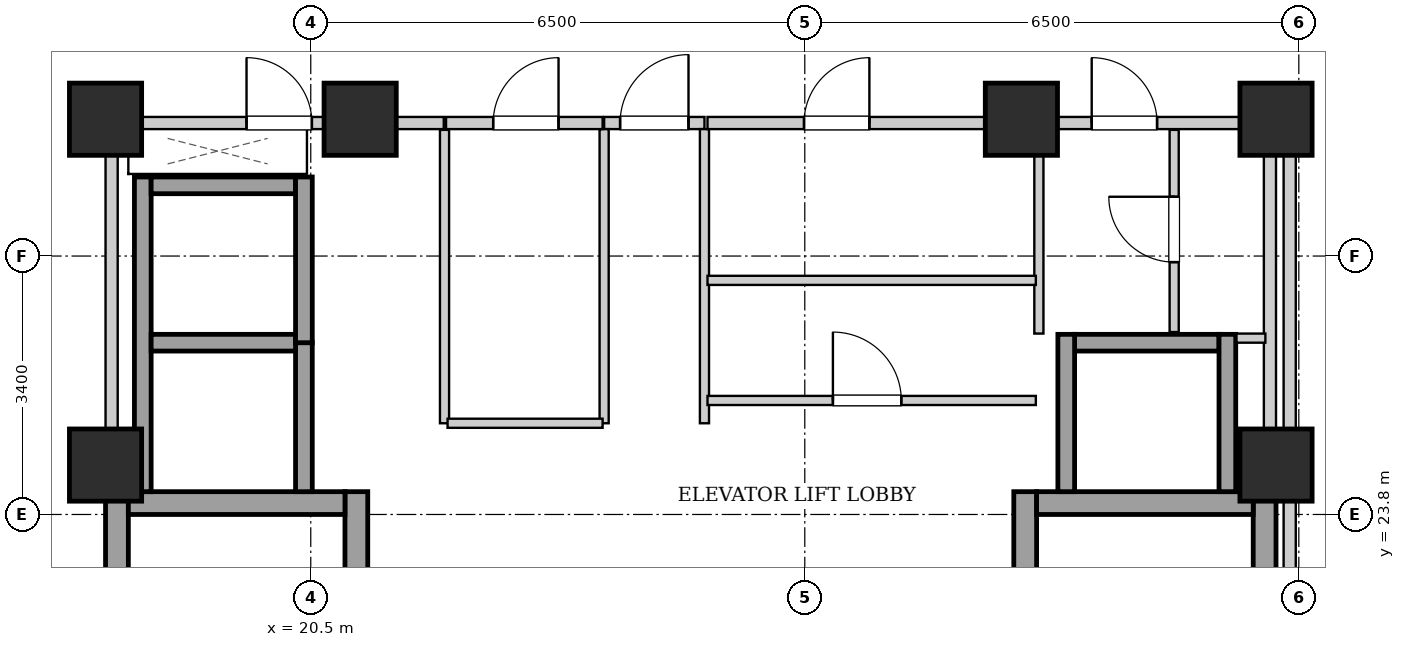
"""IFC4 building model, lengths in metres.
Left out: names, types, materials, properties, quantities, classifications, styles, units other than length and angle.
Written with IfcOpenShell. Run it as: python <this file> out.ifc"""

import sys

from ifc_helpers import new_model, si_unit, direction, frame, frame_2d, origin, origin_2d, place, context, subcontext, project, spatial, rectangle, extrude, element, fill, save


model = new_model("IFC4")
c1 = context("Model", 3, precision=1e-05, world=origin(), true_north=direction((0.0, 1.0)))
c2 = subcontext(c1, "Body", "Model", "MODEL_VIEW")
j1 = project(units=[si_unit("LENGTHUNIT", "METRE"), si_unit("PLANEANGLEUNIT", "RADIAN")], contexts=[c1])
p1 = place(None, origin())
s1 = spatial("IfcSite", under=j1, at=p1, CompositionType="ELEMENT")
p2 = place(p1, origin())
s2 = spatial("IfcBuilding", under=s1, at=p2, CompositionType="ELEMENT")
p3 = place(p2, frame((0.0, 0.0, 153.65)))
s3 = spatial("IfcBuildingStorey", under=s2, at=p3, CompositionType="ELEMENT", Elevation=153.65)
for number, where, z_axis, x_axis in (
    (1, (17.8, 29.0, 0.0), (0.0, 0.0, 1.0), (1.0, 0.0, 0.0)),
    (2, (21.15, 29.0, 0.0), (0.0, 0.0, 1.0), (1.0, 0.0, 0.0)),
    (3, (29.85, 29.0, 0.0), (0.0, 0.0, 1.0), (1.0, 0.0, 0.0)),
    (4, (33.2, 29.0, 0.0), (0.0, 0.0, 1.0), (1.0, 0.0, 0.0)),
    (5, (17.8, 24.45, 0.0), (0.0, 0.0, 1.0), (1.0, 0.0, 0.0)),
    (6, (33.2, 24.45, 0.0), (0.0, 0.0, 1.0), (1.0, 0.0, 0.0)),
):
    element("IfcColumn", number, at=place(p3, frame(where, z_axis=z_axis, x_axis=x_axis)), inside=s3, PredefinedType="COLUMN", context=c2, shape_type="SweptSolid", body=[
        extrude(rectangle(XDim=0.95, YDim=0.95, at=origin_2d()), origin(), (0.0, 0.0, 1.0), 3.25),
    ])
for number, where, z_axis, x_axis in (
    (7, (17.95, 15.1, 0.0), (0.0, 0.0, 1.0), (0.0, 1.0, 0.0)),
    (8, (21.1, 15.1, 0.0), (0.0, 0.0, 1.0), (0.0, 1.0, 0.0)),
):
    element("IfcWall", number, at=place(p3, frame(where, z_axis=z_axis, x_axis=x_axis)), inside=s3, PredefinedType="SHEAR", context=c2, shape_type="SweptSolid", body=[
        extrude(rectangle(XDim=9.0, YDim=0.3, at=frame_2d((4.5, 0.0))), origin(), (0.0, 0.0, 1.0), 2.99),
    ])
p4 = place(p3, frame((18.1, 23.95, 0.0), z_axis=(0.0, 0.0, 1.0), x_axis=(1.0, 0.0, 0.0)))
e9 = element("IfcWall", 9, at=p4, inside=s3, PredefinedType="SHEAR", context=c2, shape_type="SweptSolid", body=[
    extrude(rectangle(XDim=2.85, YDim=0.3, at=frame_2d((1.425, 0.0))), origin(), (0.0, 0.0, 1.0), 2.99),
])
for number, where, z_axis, x_axis in (
    (10, (29.9, 15.1, 0.0), (0.0, 0.0, 1.0), (0.0, 1.0, 0.0)),
    (11, (33.05, 15.1, 0.0), (0.0, 0.0, 1.0), (0.0, 1.0, 0.0)),
):
    element("IfcWall", number, at=place(p3, frame(where, z_axis=z_axis, x_axis=x_axis)), inside=s3, PredefinedType="SHEAR", context=c2, shape_type="SweptSolid", body=[
        extrude(rectangle(XDim=9.0, YDim=0.3, at=frame_2d((4.5, 0.0))), origin(), (0.0, 0.0, 1.0), 2.99),
    ])
p5 = place(p3, frame((30.05, 23.95, 0.0), z_axis=(0.0, 0.0, 1.0), x_axis=(1.0, 0.0, 0.0)))
e12 = element("IfcWall", 12, at=p5, inside=s3, PredefinedType="SHEAR", context=c2, shape_type="SweptSolid", body=[
    extrude(rectangle(XDim=2.85, YDim=0.3, at=frame_2d((1.425, 0.0))), origin(), (0.0, 0.0, 1.0), 2.99),
])
p6 = place(p3, frame((18.29, 24.1, 0.0), z_axis=(0.0, 0.0, 1.0), x_axis=(0.0, 1.0, 0.0)))
e13 = element("IfcWall", 13, at=p6, inside=s3, PredefinedType="SHEAR", context=c2, shape_type="SweptSolid", body=[
    extrude(rectangle(XDim=4.14, YDim=0.22, at=frame_2d((2.07, 0.0))), origin(), (0.0, 0.0, 1.0), 2.99),
])
p7 = place(p3, frame((20.41, 24.1, 0.0), z_axis=(0.0, 0.0, 1.0), x_axis=(0.0, 1.0, 0.0)))
e14 = element("IfcWall", 14, at=p7, inside=s3, PredefinedType="SHEAR", context=c2, shape_type="SweptSolid", body=[
    extrude(rectangle(XDim=1.96, YDim=0.22, at=frame_2d((0.98, 0.0))), origin(), (0.0, 0.0, 1.0), 2.99),
])
for number, where, z_axis, x_axis in (
    (15, (18.4, 26.06, 0.0), (0.0, 0.0, 1.0), (1.0, 0.0, 0.0)),
    (16, (18.4, 28.13, 0.0), (0.0, 0.0, 1.0), (1.0, 0.0, 0.0)),
):
    element("IfcWall", number, at=place(p3, frame(where, z_axis=z_axis, x_axis=x_axis)), inside=s3, PredefinedType="SHEAR", context=c2, shape_type="SweptSolid", body=[
        extrude(rectangle(XDim=1.9, YDim=0.22, at=frame_2d((0.95, 0.0))), origin(), (0.0, 0.0, 1.0), 2.99),
    ])
p8 = place(p3, frame((20.41, 26.06, 0.0), z_axis=(0.0, 0.0, 1.0), x_axis=(0.0, 1.0, 0.0)))
e17 = element("IfcWall", 17, at=p8, inside=s3, PredefinedType="SHEAR", context=c2, shape_type="SweptSolid", body=[
    extrude(rectangle(XDim=2.18, YDim=0.22, at=frame_2d((1.09, 0.0))), origin(), (0.0, 0.0, 1.0), 2.99),
])
p9 = place(p3, frame((30.55, 26.06, 0.0), z_axis=(0.0, 0.0, 1.0), x_axis=(1.0, 0.0, 0.0)))
e18 = element("IfcWall", 18, at=p9, inside=s3, PredefinedType="SHEAR", context=c2, shape_type="SweptSolid", body=[
    extrude(rectangle(XDim=1.9, YDim=0.22, at=frame_2d((0.95, 0.0))), origin(), (0.0, 0.0, 1.0), 2.99),
])
for number, where, z_axis, x_axis in (
    (19, (30.44, 24.1, 0.0), (0.0, 0.0, 1.0), (0.0, 1.0, 0.0)),
    (20, (32.56, 24.1, 0.0), (0.0, 0.0, 1.0), (0.0, 1.0, 0.0)),
):
    element("IfcWall", number, at=place(p3, frame(where, z_axis=z_axis, x_axis=x_axis)), inside=s3, PredefinedType="SHEAR", context=c2, shape_type="SweptSolid", body=[
        extrude(rectangle(XDim=2.07, YDim=0.22, at=frame_2d((1.035, 0.0))), origin(), (0.0, 0.0, 1.0), 2.99),
    ])
for number, where, z_axis, x_axis in (
    (21, (17.88, 24.12, 0.0), (0.0, 0.0, 1.0), (0.0, 1.0, 0.0)),
    (22, (33.12, 24.12, 0.0), (0.0, 0.0, 1.0), (0.0, 1.0, 0.0)),
):
    element("IfcWall", number, at=place(p3, frame(where, z_axis=z_axis, x_axis=x_axis)), inside=s3, PredefinedType="PARTITIONING", context=c2, shape_type="SweptSolid", body=[
        extrude(rectangle(XDim=4.76, YDim=0.16, at=frame_2d((2.38, 0.0))), origin(), (0.0, 0.0, 1.0), 2.99),
    ])
p10 = place(p3, frame((24.36, 28.95, 0.0), z_axis=(0.0, 0.0, 1.0), x_axis=(1.0, 0.0, 0.0)))
e23 = element("IfcWall", 23, at=p10, inside=s3, PredefinedType="PARTITIONING", context=c2, shape_type="SweptSolid", body=[
    extrude(rectangle(XDim=1.32, YDim=0.16, at=frame_2d((0.66, 0.0))), origin(), (0.0, 0.0, 1.0), 2.442),
])
p11 = place(p10, frame((0.21, 0.0, 0.0)))
e24 = element("IfcOpeningElement", 24, at=p11, cuts=e23, PredefinedType="OPENING", context=c2, shape_type="SweptSolid", body=[
    extrude(rectangle(XDim=0.9, YDim=2.05, at=frame_2d((0.45, 1.025))), frame((0.0, 0.09, 0.0), z_axis=(0.0, -1.0, 0.0), x_axis=(1.0, 0.0, 0.0)), (0.0, 0.0, 1.0), 0.18),
])
p12 = place(p3, frame((17.96, 28.95, 0.0), z_axis=(0.0, 0.0, 1.0), x_axis=(1.0, 0.0, 0.0)))
e25 = element("IfcWall", 25, at=p12, inside=s3, PredefinedType="PARTITIONING", context=c2, shape_type="SweptSolid", body=[
    extrude(rectangle(XDim=4.29, YDim=0.16, at=frame_2d((2.145, 0.0))), origin(), (0.0, 0.0, 1.0), 2.442),
])
p13 = place(p12, frame((1.695, 0.0, 0.0)))
e26 = element("IfcOpeningElement", 26, at=p13, cuts=e25, PredefinedType="OPENING", context=c2, shape_type="SweptSolid", body=[
    extrude(rectangle(XDim=0.86, YDim=2.05, at=frame_2d((0.43, 1.025))), frame((0.0, 0.09, 0.0), z_axis=(0.0, -1.0, 0.0), x_axis=(1.0, 0.0, 0.0)), (0.0, 0.0, 1.0), 0.18),
])
for number, where, z_axis, x_axis in (
    (27, (24.36, 25.0, 0.0), (0.0, 0.0, 1.0), (0.0, 1.0, 0.0)),
    (28, (25.68, 25.0, 0.0), (0.0, 0.0, 1.0), (0.0, 1.0, 0.0)),
):
    element("IfcWall", number, at=place(p3, frame(where, z_axis=z_axis, x_axis=x_axis)), inside=s3, PredefinedType="PARTITIONING", context=c2, shape_type="SweptSolid", body=[
        extrude(rectangle(XDim=3.87, YDim=0.12, at=frame_2d((1.935, 0.0))), origin(), (0.0, 0.0, 1.0), 2.99),
    ])
p14 = place(p3, frame((30.08, 26.18, 0.0), z_axis=(0.0, 0.0, 1.0), x_axis=(0.0, 1.0, 0.0)))
e29 = element("IfcWall", 29, at=p14, inside=s3, PredefinedType="PARTITIONING", context=c2, shape_type="SweptSolid", body=[
    extrude(rectangle(XDim=2.68, YDim=0.12, at=frame_2d((1.34, 0.0))), origin(), (0.0, 0.0, 1.0), 2.99),
])
p15 = place(p3, frame((32.68, 26.12, 0.0), z_axis=(0.0, 0.0, 1.0), x_axis=(1.0, 0.0, 0.0)))
e30 = element("IfcWall", 30, at=p15, inside=s3, PredefinedType="PARTITIONING", context=c2, shape_type="SweptSolid", body=[
    extrude(rectangle(XDim=0.38, YDim=0.12, at=frame_2d((0.19, 0.0))), origin(), (0.0, 0.0, 1.0), 2.99),
])
p16 = place(p3, frame((31.86, 26.2, 0.0), z_axis=(0.0, 0.0, 1.0), x_axis=(0.0, 1.0, 0.0)))
e31 = element("IfcWall", 31, at=p16, inside=s3, PredefinedType="PARTITIONING", context=c2, shape_type="SweptSolid", body=[
    extrude(rectangle(XDim=2.66, YDim=0.12, at=frame_2d((1.33, 0.0))), origin(), (0.0, 0.0, 1.0), 2.99),
])
p17 = place(p16, frame((0.92, 0.0, 0.0)))
e32 = element("IfcOpeningElement", 32, at=p17, cuts=e31, PredefinedType="OPENING", context=c2, shape_type="SweptSolid", body=[
    extrude(rectangle(XDim=0.86, YDim=2.05, at=frame_2d((0.43, 1.025))), frame((0.0, 0.07, 0.0), z_axis=(0.0, -1.0, 0.0), x_axis=(1.0, 0.0, 0.0)), (0.0, 0.0, 1.0), 0.14),
])
p18 = place(p3, frame((30.08, 28.95, 0.0), z_axis=(0.0, 0.0, 1.0), x_axis=(1.0, 0.0, 0.0)))
e33 = element("IfcWall", 33, at=p18, inside=s3, PredefinedType="PARTITIONING", context=c2, shape_type="SweptSolid", body=[
    extrude(rectangle(XDim=2.96, YDim=0.16, at=frame_2d((1.48, 0.0))), origin(), (0.0, 0.0, 1.0), 2.99),
])
p19 = place(p18, frame((0.695, 0.0, 0.0)))
e34 = element("IfcOpeningElement", 34, at=p19, cuts=e33, PredefinedType="OPENING", context=c2, shape_type="SweptSolid", body=[
    extrude(rectangle(XDim=0.86, YDim=2.05, at=frame_2d((0.43, 1.025))), frame((0.0, 0.09, 0.0), z_axis=(0.0, -1.0, 0.0), x_axis=(1.0, 0.0, 0.0)), (0.0, 0.0, 1.0), 0.18),
])
p20 = place(p3, frame((22.26, 25.0, 0.0), z_axis=(0.0, 0.0, 1.0), x_axis=(0.0, 1.0, 0.0)))
e35 = element("IfcWall", 35, at=p20, inside=s3, PredefinedType="PARTITIONING", context=c2, shape_type="SweptSolid", body=[
    extrude(rectangle(XDim=3.86, YDim=0.12, at=frame_2d((1.93, 0.0))), origin(), (0.0, 0.0, 1.0), 2.99),
])
p21 = place(p3, frame((22.3, 25.0, 0.0), z_axis=(0.0, 0.0, 1.0), x_axis=(1.0, 0.0, 0.0)))
e36 = element("IfcWall", 36, at=p21, inside=s3, PredefinedType="PARTITIONING", context=c2, shape_type="SweptSolid", body=[
    extrude(rectangle(XDim=2.04, YDim=0.12, at=frame_2d((1.02, 0.0))), origin(), (0.0, 0.0, 1.0), 2.99),
])
p22 = place(p3, frame((22.28, 28.95, 0.0), z_axis=(0.0, 0.0, 1.0), x_axis=(1.0, 0.0, 0.0)))
e37 = element("IfcWall", 37, at=p22, inside=s3, PredefinedType="PARTITIONING", context=c2, shape_type="SweptSolid", body=[
    extrude(rectangle(XDim=2.06, YDim=0.16, at=frame_2d((1.03, 0.0))), origin(), (0.0, 0.0, 1.0), 2.442),
])
p23 = place(p22, frame((0.62, 0.0, 0.0)))
e38 = element("IfcOpeningElement", 38, at=p23, cuts=e37, PredefinedType="OPENING", context=c2, shape_type="SweptSolid", body=[
    extrude(rectangle(XDim=0.86, YDim=2.05, at=frame_2d((0.43, 1.025))), frame((0.0, 0.09, 0.0), z_axis=(0.0, -1.0, 0.0), x_axis=(1.0, 0.0, 0.0)), (0.0, 0.0, 1.0), 0.18),
])
p24 = place(p3, frame((25.72, 26.88, 0.0), z_axis=(0.0, 0.0, 1.0), x_axis=(1.0, 0.0, 0.0)))
e39 = element("IfcWall", 39, at=p24, inside=s3, PredefinedType="PARTITIONING", context=c2, shape_type="SweptSolid", body=[
    extrude(rectangle(XDim=4.32, YDim=0.12, at=frame_2d((2.16, 0.0))), origin(), (0.0, 0.0, 1.0), 2.99),
])
p25 = place(p3, frame((25.72, 25.3, 0.0), z_axis=(0.0, 0.0, 1.0), x_axis=(1.0, 0.0, 0.0)))
e40 = element("IfcWall", 40, at=p25, inside=s3, PredefinedType="PARTITIONING", context=c2, shape_type="SweptSolid", body=[
    extrude(rectangle(XDim=4.32, YDim=0.12, at=frame_2d((2.16, 0.0))), origin(), (0.0, 0.0, 1.0), 2.99),
])
p26 = place(p25, frame((1.65, 0.0, 0.0)))
e41 = element("IfcOpeningElement", 41, at=p26, cuts=e40, PredefinedType="OPENING", context=c2, shape_type="SweptSolid", body=[
    extrude(rectangle(XDim=0.9, YDim=2.05, at=frame_2d((0.45, 1.025))), frame((0.0, 0.07, 0.0), z_axis=(0.0, -1.0, 0.0), x_axis=(1.0, 0.0, 0.0)), (0.0, 0.0, 1.0), 0.14),
])
p27 = place(p3, frame((25.72, 28.95, 0.0), z_axis=(0.0, 0.0, 1.0), x_axis=(1.0, 0.0, 0.0)))
e42 = element("IfcWall", 42, at=p27, inside=s3, PredefinedType="PARTITIONING", context=c2, shape_type="SweptSolid", body=[
    extrude(rectangle(XDim=4.32, YDim=0.16, at=frame_2d((2.16, 0.0))), origin(), (0.0, 0.0, 1.0), 2.442),
])
p28 = place(p27, frame((1.27, 0.0, 0.0)))
e43 = element("IfcOpeningElement", 43, at=p28, cuts=e42, PredefinedType="OPENING", context=c2, shape_type="SweptSolid", body=[
    extrude(rectangle(XDim=0.86, YDim=2.05, at=frame_2d((0.43, 1.025))), frame((0.0, 0.09, 0.0), z_axis=(0.0, -1.0, 0.0), x_axis=(1.0, 0.0, 0.0)), (0.0, 0.0, 1.0), 0.18),
])
p29 = place(p3, frame((33.38, 15.02, 0.0), z_axis=(0.0, 0.0, 1.0), x_axis=(0.0, 1.0, 0.0)))
e44 = element("IfcWall", 44, at=p29, inside=s3, PredefinedType="PARTITIONING", context=c2, shape_type="SweptSolid", body=[
    extrude(rectangle(XDim=13.98, YDim=0.16, at=frame_2d((6.99, 0.0))), origin(), (0.0, 0.0, 1.0), 2.99),
])
p30 = place(p11, origin())
e45 = element("IfcDoor", 45, at=p30, inside=s3, OperationType="SINGLE_SWING_RIGHT", PredefinedType="DOOR", context=c2, shape_type="SweptSolid", body=[
    extrude(rectangle(XDim=0.9, YDim=2.05, at=frame_2d((0.45, 1.025))), frame((0.0, 0.025, 0.0), z_axis=(0.0, -1.0, 0.0), x_axis=(1.0, 0.0, 0.0)), (0.0, 0.0, 1.0), 0.05),
])
fill(e24, e45)
p31 = place(p13, origin())
e46 = element("IfcDoor", 46, at=p31, inside=s3, OperationType="SINGLE_SWING_LEFT", PredefinedType="DOOR", context=c2, shape_type="SweptSolid", body=[
    extrude(rectangle(XDim=0.86, YDim=2.05, at=frame_2d((0.43, 1.025))), frame((0.0, 0.025, 0.0), z_axis=(0.0, -1.0, 0.0), x_axis=(1.0, 0.0, 0.0)), (0.0, 0.0, 1.0), 0.05),
])
fill(e26, e46)
p32 = place(p17, origin())
e47 = element("IfcDoor", 47, at=p32, inside=s3, OperationType="SINGLE_SWING_RIGHT", PredefinedType="DOOR", context=c2, shape_type="SweptSolid", body=[
    extrude(rectangle(XDim=0.86, YDim=2.05, at=frame_2d((0.43, 1.025))), frame((0.0, 0.025, 0.0), z_axis=(0.0, -1.0, 0.0), x_axis=(1.0, 0.0, 0.0)), (0.0, 0.0, 1.0), 0.05),
])
fill(e32, e47)
p33 = place(p19, origin())
e48 = element("IfcDoor", 48, at=p33, inside=s3, OperationType="SINGLE_SWING_LEFT", PredefinedType="DOOR", context=c2, shape_type="SweptSolid", body=[
    extrude(rectangle(XDim=0.86, YDim=2.05, at=frame_2d((0.43, 1.025))), frame((0.0, 0.025, 0.0), z_axis=(0.0, -1.0, 0.0), x_axis=(1.0, 0.0, 0.0)), (0.0, 0.0, 1.0), 0.05),
])
fill(e34, e48)
p34 = place(p23, origin())
e49 = element("IfcDoor", 49, at=p34, inside=s3, OperationType="SINGLE_SWING_RIGHT", PredefinedType="DOOR", context=c2, shape_type="SweptSolid", body=[
    extrude(rectangle(XDim=0.86, YDim=2.05, at=frame_2d((0.43, 1.025))), frame((0.0, 0.025, 0.0), z_axis=(0.0, -1.0, 0.0), x_axis=(1.0, 0.0, 0.0)), (0.0, 0.0, 1.0), 0.05),
])
fill(e38, e49)
p35 = place(p26, origin())
e50 = element("IfcDoor", 50, at=p35, inside=s3, OperationType="SINGLE_SWING_LEFT", PredefinedType="DOOR", context=c2, shape_type="SweptSolid", body=[
    extrude(rectangle(XDim=0.9, YDim=2.05, at=frame_2d((0.45, 1.025))), frame((0.0, 0.025, 0.0), z_axis=(0.0, -1.0, 0.0), x_axis=(1.0, 0.0, 0.0)), (0.0, 0.0, 1.0), 0.05),
])
fill(e41, e50)
p36 = place(p28, origin())
e51 = element("IfcDoor", 51, at=p36, inside=s3, OperationType="SINGLE_SWING_RIGHT", PredefinedType="DOOR", context=c2, shape_type="SweptSolid", body=[
    extrude(rectangle(XDim=0.86, YDim=2.05, at=frame_2d((0.43, 1.025))), frame((0.0, 0.025, 0.0), z_axis=(0.0, -1.0, 0.0), x_axis=(1.0, 0.0, 0.0)), (0.0, 0.0, 1.0), 0.05),
])
fill(e43, e51)
save(model, sys.argv[1])
